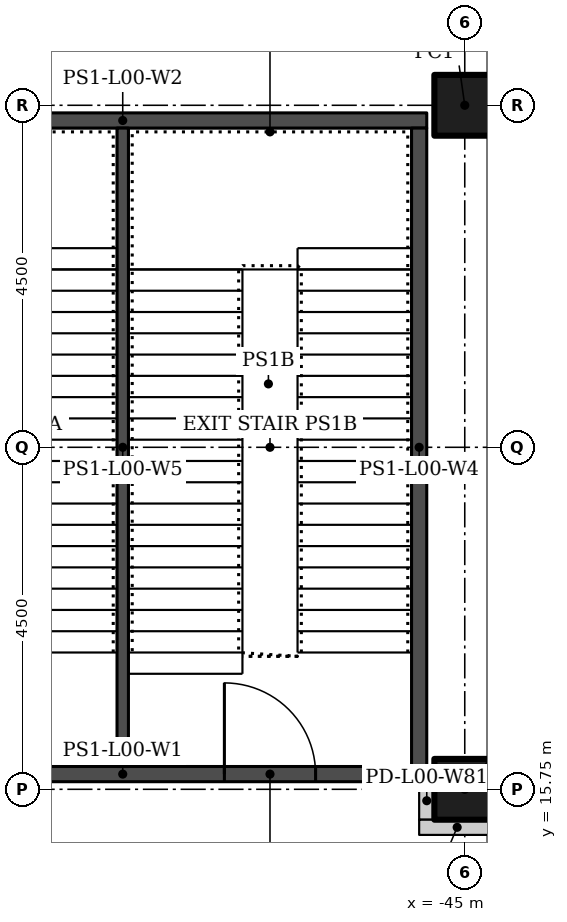
"""IFC4 building model, lengths in metres.
Left out: names, types, materials, properties, quantities, classifications, styles, units other than length and angle.
Written with IfcOpenShell. Run it as: python <this file> out.ifc"""

import sys

from ifc_helpers import new_model, si_unit, direction, frame, frame_2d, origin, origin_2d, place, context, subcontext, project, spatial, rectangle, hollow_rectangle, extrude, element, fill, save


model = new_model("IFC4")
c1 = context("Model", 3, precision=1e-05, world=origin(), true_north=direction((0.0, 1.0)))
c2 = subcontext(c1, "Body", "Model", "MODEL_VIEW")
j1 = project(units=[si_unit("LENGTHUNIT", "METRE"), si_unit("PLANEANGLEUNIT", "RADIAN")], contexts=[c1])
p1 = place(None, origin())
s1 = spatial("IfcSite", under=j1, at=p1, CompositionType="ELEMENT")
p2 = place(p1, origin())
s2 = spatial("IfcBuilding", under=s1, at=p2, CompositionType="ELEMENT")
p3 = place(p2, origin())
s3 = spatial("IfcBuildingStorey", under=s2, at=p3, CompositionType="ELEMENT", Elevation=0.0)
for number, where in (
    (1, (-45.0, 15.75, 0.0)),
    (2, (-45.0, 24.75, 0.0)),
):
    element("IfcColumn", number, at=place(p3, frame(where)), inside=s3, PredefinedType="COLUMN", context=c2, shape_type="SweptSolid", body=[
        extrude(hollow_rectangle(XDim=0.8, YDim=0.8, WallThickness=0.03, at=origin_2d()), origin(), (0.0, 0.0, 1.0), 6.1),
    ])
p4 = place(p3, frame((-44.6, 33.655, 0.0), z_axis=(0.0, 0.0, 1.0), x_axis=(0.0, -1.0, 0.0)))
e3 = element("IfcWall", 3, at=p4, inside=s3, PredefinedType="PARTITIONING", context=c2, shape_type="SweptSolid", body=[
    extrude(rectangle(XDim=21.605, YDim=0.2, at=frame_2d((10.802, 0.0))), origin(), (0.0, 0.0, 1.0), 6.1),
])
p5 = place(p4, frame((18.705, 0.0, 0.0)))
e4 = element("IfcOpeningElement", 4, at=p5, cuts=e3, PredefinedType="OPENING", context=c2, shape_type="SweptSolid", body=[
    extrude(rectangle(XDim=1.8, YDim=2.1, at=frame_2d((0.9, 1.05))), frame((0.0, 0.11, 0.0), z_axis=(0.0, -1.0, 0.0), x_axis=(1.0, 0.0, 0.0)), (0.0, 0.0, 1.0), 0.22),
])
p6 = place(p3, frame((-45.5, 15.85, 0.0), z_axis=(0.0, 0.0, 1.0), x_axis=(0.0, -1.0, 0.0)))
e5 = element("IfcWall", 5, at=p6, inside=s3, PredefinedType="PARTITIONING", context=c2, shape_type="SweptSolid", body=[
    extrude(rectangle(XDim=0.5, YDim=0.2, at=frame_2d((0.25, 0.0))), origin(), (0.0, 0.0, 1.0), 6.1),
])
p7 = place(p3, frame((-45.6, 15.25, 0.0)))
e6 = element("IfcWall", 6, at=p7, inside=s3, PredefinedType="PARTITIONING", context=c2, shape_type="SweptSolid", body=[
    extrude(rectangle(XDim=1.0, YDim=0.2, at=frame_2d((0.5, 0.0))), origin(), (0.0, 0.0, 1.0), 6.1),
])
p8 = place(p3, frame((-53.5, 15.95, 0.0)))
e7 = element("IfcWall", 7, at=p8, inside=s3, PredefinedType="SHEAR", context=c2, shape_type="SweptSolid", body=[
    extrude(rectangle(XDim=8.0, YDim=0.2, at=frame_2d((4.0, 0.0))), origin(), (0.0, 0.0, 1.0), 6.1),
])
p9 = place(p8, frame((1.462, 0.0, 0.0)))
e8 = element("IfcOpeningElement", 8, at=p9, cuts=e7, PredefinedType="OPENING", context=c2, shape_type="SweptSolid", body=[
    extrude(rectangle(XDim=1.2, YDim=2.4, at=frame_2d((0.6, 1.2))), frame((0.0, 0.11, 0.0), z_axis=(0.0, -1.0, 0.0), x_axis=(1.0, 0.0, 0.0)), (0.0, 0.0, 1.0), 0.22),
])
p10 = place(p8, frame((5.337, 0.0, 0.0)))
e9 = element("IfcOpeningElement", 9, at=p10, cuts=e7, PredefinedType="OPENING", context=c2, shape_type="SweptSolid", body=[
    extrude(rectangle(XDim=1.2, YDim=2.4, at=frame_2d((0.6, 1.2))), frame((0.0, 0.11, 0.0), z_axis=(0.0, -1.0, 0.0), x_axis=(1.0, 0.0, 0.0)), (0.0, 0.0, 1.0), 0.22),
])
p11 = place(p3, frame((-53.5, 24.55, 0.0)))
e10 = element("IfcWall", 10, at=p11, inside=s3, PredefinedType="SHEAR", context=c2, shape_type="SweptSolid", body=[
    extrude(rectangle(XDim=8.0, YDim=0.2, at=frame_2d((4.0, 0.0))), origin(), (0.0, 0.0, 1.0), 6.1),
])
p12 = place(p3, frame((-45.6, 16.05, 0.0), z_axis=(0.0, 0.0, 1.0), x_axis=(0.0, 1.0, 0.0)))
e11 = element("IfcWall", 11, at=p12, inside=s3, PredefinedType="SHEAR", context=c2, shape_type="SweptSolid", body=[
    extrude(rectangle(XDim=8.4, YDim=0.2, at=frame_2d((4.2, 0.0))), origin(), (0.0, 0.0, 1.0), 6.1),
])
p13 = place(p3, frame((-49.5, 16.05, 0.0), z_axis=(0.0, 0.0, 1.0), x_axis=(0.0, 1.0, 0.0)))
e12 = element("IfcWall", 12, at=p13, inside=s3, PredefinedType="SHEAR", context=c2, shape_type="SweptSolid", body=[
    extrude(rectangle(XDim=8.4, YDim=0.15, at=frame_2d((4.2, 0.0))), origin(), (0.0, 0.0, 1.0), 6.1),
])
p14 = place(p10, origin())
e13 = element("IfcDoor", 13, at=p14, inside=s3, OperationType="SINGLE_SWING_RIGHT", PredefinedType="DOOR", context=c2, shape_type="SweptSolid", body=[
    extrude(rectangle(XDim=1.2, YDim=2.4, at=frame_2d((0.6, 1.2))), frame((0.0, 0.025, 0.0), z_axis=(0.0, -1.0, 0.0), x_axis=(1.0, 0.0, 0.0)), (0.0, 0.0, 1.0), 0.05),
])
fill(e9, e13)
save(model, sys.argv[1])
